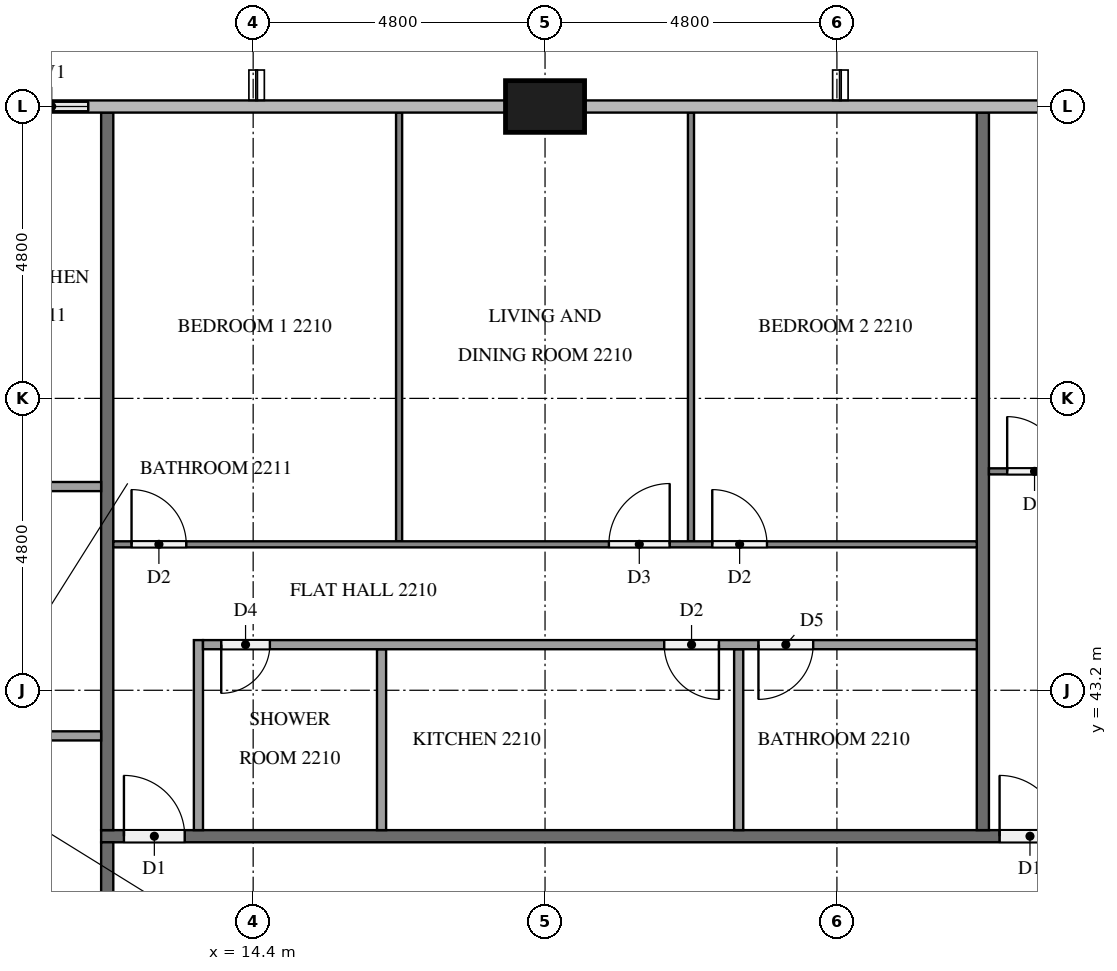
"""IFC4 building model, lengths in metres.
Left out: names, types, materials, properties, quantities, classifications, styles, units other than length and angle.
Written with IfcOpenShell. Run it as: python <this file> out.ifc"""

import sys

from ifc_helpers import new_model, si_unit, direction, frame, frame_2d, origin, origin_2d, place, context, subcontext, project, spatial, rectangle, extrude, element, fill, save


model = new_model("IFC4")
c1 = context("Model", 3, precision=1e-05, world=origin(), true_north=direction((0.0, 1.0)))
c2 = subcontext(c1, "Body", "Model", "MODEL_VIEW")
j1 = project(units=[si_unit("LENGTHUNIT", "METRE"), si_unit("PLANEANGLEUNIT", "RADIAN")], contexts=[c1])
p1 = place(None, origin())
s1 = spatial("IfcSite", under=j1, at=p1, CompositionType="ELEMENT")
p2 = place(p1, origin())
s2 = spatial("IfcBuilding", under=s1, at=p2, CompositionType="ELEMENT")
p3 = place(p2, frame((0.0, 0.0, 89.2)))
s3 = spatial("IfcBuildingStorey", under=s2, at=p3, CompositionType="ELEMENT", Elevation=89.2)
p4 = place(p3, frame((19.2, 52.8, 0.0), z_axis=(0.0, 0.0, 1.0), x_axis=(1.0, 0.0, 0.0)))
e1 = element("IfcColumn", 1, at=p4, inside=s3, PredefinedType="COLUMN", context=c2, shape_type="SweptSolid", body=[
    extrude(rectangle(XDim=1.3, YDim=0.85, at=origin_2d()), origin(), (0.0, 0.0, 1.0), 3.2),
])
p5 = place(p3, frame((12.0, 52.8, 0.0), z_axis=(0.0, 0.0, 1.0), x_axis=(-1.0, 0.0, 0.0)))
e2 = element("IfcWall", 2, at=p5, inside=s3, PredefinedType="SOLIDWALL", context=c2, shape_type="SweptSolid", body=[
    extrude(rectangle(XDim=1.825, YDim=0.15, at=frame_2d((0.913, 0.0))), origin(), (0.0, 0.0, 1.0), 3.2),
])
p6 = place(p5, frame((0.312, 0.0, 0.9)))
e3 = element("IfcOpeningElement", 3, at=p6, cuts=e2, PredefinedType="OPENING", context=c2, shape_type="SweptSolid", body=[
    extrude(rectangle(XDim=1.2, YDim=1.4, at=frame_2d((0.6, 0.7))), frame((0.0, 0.085, 0.0), z_axis=(0.0, -1.0, 0.0), x_axis=(1.0, 0.0, 0.0)), (0.0, 0.0, 1.0), 0.17),
])
p7 = place(p3, frame((11.9, 40.8, 0.0), z_axis=(0.0, 0.0, 1.0), x_axis=(1.0, 0.0, 0.0)))
e4 = element("IfcWall", 4, at=p7, inside=s3, PredefinedType="PARTITIONING", context=c2, shape_type="SweptSolid", body=[
    extrude(rectangle(XDim=38.6, YDim=0.2, at=frame_2d((19.3, 0.0))), origin(), (0.0, 0.0, 1.0), 3.2),
])
p8 = place(p7, frame((31.575, 0.0, 0.0)))
e5 = element("IfcOpeningElement", 5, at=p8, cuts=e4, PredefinedType="OPENING", context=c2, shape_type="SweptSolid", body=[
    extrude(rectangle(XDim=1.0, YDim=2.1, at=frame_2d((0.5, 1.05))), frame((0.0, 0.11, 0.0), z_axis=(0.0, -1.0, 0.0), x_axis=(1.0, 0.0, 0.0)), (0.0, 0.0, 1.0), 0.22),
])
p9 = place(p7, frame((14.775, 0.0, 0.0)))
e6 = element("IfcOpeningElement", 6, at=p9, cuts=e4, PredefinedType="OPENING", context=c2, shape_type="SweptSolid", body=[
    extrude(rectangle(XDim=1.0, YDim=2.1, at=frame_2d((0.5, 1.05))), frame((0.0, 0.11, 0.0), z_axis=(0.0, -1.0, 0.0), x_axis=(1.0, 0.0, 0.0)), (0.0, 0.0, 1.0), 0.22),
])
p10 = place(p7, frame((0.375, 0.0, 0.0)))
e7 = element("IfcOpeningElement", 7, at=p10, cuts=e4, PredefinedType="OPENING", context=c2, shape_type="SweptSolid", body=[
    extrude(rectangle(XDim=1.0, YDim=2.1, at=frame_2d((0.5, 1.05))), frame((0.0, 0.11, 0.0), z_axis=(0.0, -1.0, 0.0), x_axis=(1.0, 0.0, 0.0)), (0.0, 0.0, 1.0), 0.22),
])
p11 = place(p3, frame((12.0, 37.9, 0.0), z_axis=(0.0, 0.0, 1.0), x_axis=(0.0, 1.0, 0.0)))
e8 = element("IfcWall", 8, at=p11, inside=s3, PredefinedType="PARTITIONING", context=c2, shape_type="SweptSolid", body=[
    extrude(rectangle(XDim=2.8, YDim=0.2, at=frame_2d((1.4, 0.0))), origin(), (0.0, 0.0, 1.0), 3.2),
])
p12 = place(p11, frame((0.175, 0.0, 0.0)))
e9 = element("IfcOpeningElement", 9, at=p12, cuts=e8, PredefinedType="OPENING", context=c2, shape_type="SweptSolid", body=[
    extrude(rectangle(XDim=1.0, YDim=2.1, at=frame_2d((0.5, 1.05))), frame((0.0, 0.11, 0.0), z_axis=(0.0, -1.0, 0.0), x_axis=(1.0, 0.0, 0.0)), (0.0, 0.0, 1.0), 0.22),
])
for number, where, z_axis, x_axis in (
    (10, (26.4, 52.7, 0.0), (0.0, 0.0, 1.0), (0.0, -1.0, 0.0)),
    (11, (12.0, 52.7, 0.0), (0.0, 0.0, 1.0), (0.0, -1.0, 0.0)),
):
    element("IfcWall", number, at=place(p3, frame(where, z_axis=z_axis, x_axis=x_axis)), inside=s3, PredefinedType="PARTITIONING", context=c2, shape_type="SweptSolid", body=[
        extrude(rectangle(XDim=11.8, YDim=0.2, at=frame_2d((5.9, 0.0))), origin(), (0.0, 0.0, 1.0), 3.2),
    ])
p13 = place(p3, frame((26.5, 46.8, 0.0), z_axis=(0.0, 0.0, 1.0), x_axis=(1.0, 0.0, 0.0)))
e12 = element("IfcWall", 12, at=p13, inside=s3, PredefinedType="PARTITIONING", context=c2, shape_type="SweptSolid", body=[
    extrude(rectangle(XDim=16.6, YDim=0.1, at=frame_2d((8.3, 0.0))), origin(), (0.0, 0.0, 1.0), 3.2),
])
p14 = place(p13, frame((0.3, 0.0, 0.0)))
e13 = element("IfcOpeningElement", 13, at=p14, cuts=e12, PredefinedType="OPENING", context=c2, shape_type="SweptSolid", body=[
    extrude(rectangle(XDim=0.9, YDim=2.1, at=frame_2d((0.45, 1.05))), frame((0.0, 0.06, 0.0), z_axis=(0.0, -1.0, 0.0), x_axis=(1.0, 0.0, 0.0)), (0.0, 0.0, 1.0), 0.12),
])
p15 = place(p13, frame((8.25, 0.0, 0.0)))
e14 = element("IfcOpeningElement", 14, at=p15, cuts=e12, PredefinedType="OPENING", context=c2, shape_type="SweptSolid", body=[
    extrude(rectangle(XDim=0.9, YDim=2.1, at=frame_2d((0.45, 1.05))), frame((0.0, 0.06, 0.0), z_axis=(0.0, -1.0, 0.0), x_axis=(1.0, 0.0, 0.0)), (0.0, 0.0, 1.0), 0.12),
])
p16 = place(p13, frame((9.85, 0.0, 0.0)))
e15 = element("IfcOpeningElement", 15, at=p16, cuts=e12, PredefinedType="OPENING", context=c2, shape_type="SweptSolid", body=[
    extrude(rectangle(XDim=1.0, YDim=2.1, at=frame_2d((0.5, 1.05))), frame((0.0, 0.06, 0.0), z_axis=(0.0, -1.0, 0.0), x_axis=(1.0, 0.0, 0.0)), (0.0, 0.0, 1.0), 0.12),
])
for number, where, z_axis, x_axis in (
    (16, (16.8, 45.65, 0.0), (0.0, 0.0, 1.0), (0.0, 1.0, 0.0)),
    (17, (21.6, 45.65, 0.0), (0.0, 0.0, 1.0), (0.0, 1.0, 0.0)),
):
    element("IfcWall", number, at=place(p3, frame(where, z_axis=z_axis, x_axis=x_axis)), inside=s3, PredefinedType="PARTITIONING", context=c2, shape_type="SweptSolid", body=[
        extrude(rectangle(XDim=7.05, YDim=0.1, at=frame_2d((3.525, 0.0))), origin(), (0.0, 0.0, 1.0), 3.2),
    ])
p17 = place(p3, frame((12.1, 45.6, 0.0), z_axis=(0.0, 0.0, 1.0), x_axis=(1.0, 0.0, 0.0)))
e18 = element("IfcWall", 18, at=p17, inside=s3, PredefinedType="PARTITIONING", context=c2, shape_type="SweptSolid", body=[
    extrude(rectangle(XDim=14.2, YDim=0.1, at=frame_2d((7.1, 0.0))), origin(), (0.0, 0.0, 1.0), 3.2),
])
p18 = place(p17, frame((0.3, 0.0, 0.0)))
e19 = element("IfcOpeningElement", 19, at=p18, cuts=e18, PredefinedType="OPENING", context=c2, shape_type="SweptSolid", body=[
    extrude(rectangle(XDim=0.9, YDim=2.1, at=frame_2d((0.45, 1.05))), frame((0.0, 0.06, 0.0), z_axis=(0.0, -1.0, 0.0), x_axis=(1.0, 0.0, 0.0)), (0.0, 0.0, 1.0), 0.12),
])
p19 = place(p17, frame((8.15, 0.0, 0.0)))
e20 = element("IfcOpeningElement", 20, at=p19, cuts=e18, PredefinedType="OPENING", context=c2, shape_type="SweptSolid", body=[
    extrude(rectangle(XDim=1.0, YDim=2.1, at=frame_2d((0.5, 1.05))), frame((0.0, 0.06, 0.0), z_axis=(0.0, -1.0, 0.0), x_axis=(1.0, 0.0, 0.0)), (0.0, 0.0, 1.0), 0.12),
])
p20 = place(p17, frame((9.85, 0.0, 0.0)))
e21 = element("IfcOpeningElement", 21, at=p20, cuts=e18, PredefinedType="OPENING", context=c2, shape_type="SweptSolid", body=[
    extrude(rectangle(XDim=0.9, YDim=2.1, at=frame_2d((0.45, 1.05))), frame((0.0, 0.06, 0.0), z_axis=(0.0, -1.0, 0.0), x_axis=(1.0, 0.0, 0.0)), (0.0, 0.0, 1.0), 0.12),
])
for number, where, z_axis, x_axis in (
    (22, (16.511, 40.9, 0.0), (0.0, 0.0, 1.0), (0.0, 1.0, 0.0)),
    (23, (22.385, 40.9, 0.0), (0.0, 0.0, 1.0), (0.0, 1.0, 0.0)),
):
    element("IfcWall", number, at=place(p3, frame(where, z_axis=z_axis, x_axis=x_axis)), inside=s3, PredefinedType="PARTITIONING", context=c2, shape_type="SweptSolid", body=[
        extrude(rectangle(XDim=2.975, YDim=0.15, at=frame_2d((1.488, 0.0))), origin(), (0.0, 0.0, 1.0), 3.2),
    ])
p21 = place(p3, frame((13.5, 40.9, 0.0), z_axis=(0.0, 0.0, 1.0), x_axis=(0.0, 1.0, 0.0)))
e24 = element("IfcWall", 24, at=p21, inside=s3, PredefinedType="PARTITIONING", context=c2, shape_type="SweptSolid", body=[
    extrude(rectangle(XDim=3.125, YDim=0.15, at=frame_2d((1.562, 0.0))), origin(), (0.0, 0.0, 1.0), 3.2),
])
p22 = place(p3, frame((26.3, 43.95, 0.0), z_axis=(0.0, 0.0, 1.0), x_axis=(-1.0, 0.0, 0.0)))
e25 = element("IfcWall", 25, at=p22, inside=s3, PredefinedType="PARTITIONING", context=c2, shape_type="SweptSolid", body=[
    extrude(rectangle(XDim=12.725, YDim=0.15, at=frame_2d((6.363, 0.0))), origin(), (0.0, 0.0, 1.0), 3.2),
])
p23 = place(p22, frame((11.625, 0.0, 0.0)))
e26 = element("IfcOpeningElement", 26, at=p23, cuts=e25, PredefinedType="OPENING", context=c2, shape_type="SweptSolid", body=[
    extrude(rectangle(XDim=0.8, YDim=2.1, at=frame_2d((0.4, 1.05))), frame((0.0, 0.085, 0.0), z_axis=(0.0, -1.0, 0.0), x_axis=(1.0, 0.0, 0.0)), (0.0, 0.0, 1.0), 0.17),
])
p24 = place(p22, frame((4.24, 0.0, 0.0)))
e27 = element("IfcOpeningElement", 27, at=p24, cuts=e25, PredefinedType="OPENING", context=c2, shape_type="SweptSolid", body=[
    extrude(rectangle(XDim=0.9, YDim=2.1, at=frame_2d((0.45, 1.05))), frame((0.0, 0.085, 0.0), z_axis=(0.0, -1.0, 0.0), x_axis=(1.0, 0.0, 0.0)), (0.0, 0.0, 1.0), 0.17),
])
p25 = place(p22, frame((2.69, 0.0, 0.0)))
e28 = element("IfcOpeningElement", 28, at=p25, cuts=e25, PredefinedType="OPENING", context=c2, shape_type="SweptSolid", body=[
    extrude(rectangle(XDim=0.9, YDim=2.1, at=frame_2d((0.45, 1.05))), frame((0.0, 0.085, 0.0), z_axis=(0.0, -1.0, 0.0), x_axis=(1.0, 0.0, 0.0)), (0.0, 0.0, 1.0), 0.17),
])
for number, where, z_axis, x_axis in (
    (29, (11.9, 42.45, 0.0), (0.0, 0.0, 1.0), (-1.0, 0.0, 0.0)),
    (30, (11.9, 46.55, 0.0), (0.0, 0.0, 1.0), (-1.0, 0.0, 0.0)),
):
    element("IfcWall", number, at=place(p3, frame(where, z_axis=z_axis, x_axis=x_axis)), inside=s3, PredefinedType="PARTITIONING", context=c2, shape_type="SweptSolid", body=[
        extrude(rectangle(XDim=1.775, YDim=0.15, at=frame_2d((0.887, 0.0))), origin(), (0.0, 0.0, 1.0), 3.2),
    ])
p26 = place(p6, origin())
e31 = element("IfcWindow", 31, at=p26, inside=s3, PartitioningType="SINGLE_PANEL", PredefinedType="WINDOW", context=c2, shape_type="SweptSolid", body=[
    extrude(rectangle(XDim=1.2, YDim=1.4, at=frame_2d((0.6, 0.7))), frame((0.0, 0.03, 0.0), z_axis=(0.0, -1.0, 0.0), x_axis=(1.0, 0.0, 0.0)), (0.0, 0.0, 1.0), 0.06),
])
fill(e3, e31)
p27 = place(p9, origin())
e32 = element("IfcDoor", 32, at=p27, inside=s3, OperationType="SINGLE_SWING_LEFT", PredefinedType="DOOR", context=c2, shape_type="SweptSolid", body=[
    extrude(rectangle(XDim=1.0, YDim=2.1, at=frame_2d((0.5, 1.05))), frame((0.0, 0.025, 0.0), z_axis=(0.0, -1.0, 0.0), x_axis=(1.0, 0.0, 0.0)), (0.0, 0.0, 1.0), 0.05),
])
fill(e6, e32)
p28 = place(p10, origin())
e33 = element("IfcDoor", 33, at=p28, inside=s3, OperationType="SINGLE_SWING_LEFT", PredefinedType="DOOR", context=c2, shape_type="SweptSolid", body=[
    extrude(rectangle(XDim=1.0, YDim=2.1, at=frame_2d((0.5, 1.05))), frame((0.0, 0.025, 0.0), z_axis=(0.0, -1.0, 0.0), x_axis=(1.0, 0.0, 0.0)), (0.0, 0.0, 1.0), 0.05),
])
fill(e7, e33)
p29 = place(p14, origin())
e34 = element("IfcDoor", 34, at=p29, inside=s3, OperationType="SINGLE_SWING_LEFT", PredefinedType="DOOR", context=c2, shape_type="SweptSolid", body=[
    extrude(rectangle(XDim=0.9, YDim=2.1, at=frame_2d((0.45, 1.05))), frame((0.0, 0.025, 0.0), z_axis=(0.0, -1.0, 0.0), x_axis=(1.0, 0.0, 0.0)), (0.0, 0.0, 1.0), 0.05),
])
fill(e13, e34)
p30 = place(p18, origin())
e35 = element("IfcDoor", 35, at=p30, inside=s3, OperationType="SINGLE_SWING_LEFT", PredefinedType="DOOR", context=c2, shape_type="SweptSolid", body=[
    extrude(rectangle(XDim=0.9, YDim=2.1, at=frame_2d((0.45, 1.05))), frame((0.0, 0.025, 0.0), z_axis=(0.0, -1.0, 0.0), x_axis=(1.0, 0.0, 0.0)), (0.0, 0.0, 1.0), 0.05),
])
fill(e19, e35)
p31 = place(p19, origin())
e36 = element("IfcDoor", 36, at=p31, inside=s3, OperationType="SINGLE_SWING_RIGHT", PredefinedType="DOOR", context=c2, shape_type="SweptSolid", body=[
    extrude(rectangle(XDim=1.0, YDim=2.1, at=frame_2d((0.5, 1.05))), frame((0.0, 0.025, 0.0), z_axis=(0.0, -1.0, 0.0), x_axis=(1.0, 0.0, 0.0)), (0.0, 0.0, 1.0), 0.05),
])
fill(e20, e36)
p32 = place(p20, origin())
e37 = element("IfcDoor", 37, at=p32, inside=s3, OperationType="SINGLE_SWING_LEFT", PredefinedType="DOOR", context=c2, shape_type="SweptSolid", body=[
    extrude(rectangle(XDim=0.9, YDim=2.1, at=frame_2d((0.45, 1.05))), frame((0.0, 0.025, 0.0), z_axis=(0.0, -1.0, 0.0), x_axis=(1.0, 0.0, 0.0)), (0.0, 0.0, 1.0), 0.05),
])
fill(e21, e37)
p33 = place(p23, origin())
e38 = element("IfcDoor", 38, at=p33, inside=s3, OperationType="SINGLE_SWING_RIGHT", PredefinedType="DOOR", context=c2, shape_type="SweptSolid", body=[
    extrude(rectangle(XDim=0.8, YDim=2.1, at=frame_2d((0.4, 1.05))), frame((0.0, 0.025, 0.0), z_axis=(0.0, -1.0, 0.0), x_axis=(1.0, 0.0, 0.0)), (0.0, 0.0, 1.0), 0.05),
])
fill(e26, e38)
p34 = place(p24, origin())
e39 = element("IfcDoor", 39, at=p34, inside=s3, OperationType="SINGLE_SWING_LEFT", PredefinedType="DOOR", context=c2, shape_type="SweptSolid", body=[
    extrude(rectangle(XDim=0.9, YDim=2.1, at=frame_2d((0.45, 1.05))), frame((0.0, 0.025, 0.0), z_axis=(0.0, -1.0, 0.0), x_axis=(1.0, 0.0, 0.0)), (0.0, 0.0, 1.0), 0.05),
])
fill(e27, e39)
p35 = place(p25, origin())
e40 = element("IfcDoor", 40, at=p35, inside=s3, OperationType="SINGLE_SWING_RIGHT", PredefinedType="DOOR", context=c2, shape_type="SweptSolid", body=[
    extrude(rectangle(XDim=0.9, YDim=2.1, at=frame_2d((0.45, 1.05))), frame((0.0, 0.025, 0.0), z_axis=(0.0, -1.0, 0.0), x_axis=(1.0, 0.0, 0.0)), (0.0, 0.0, 1.0), 0.05),
])
fill(e28, e40)
save(model, sys.argv[1])
